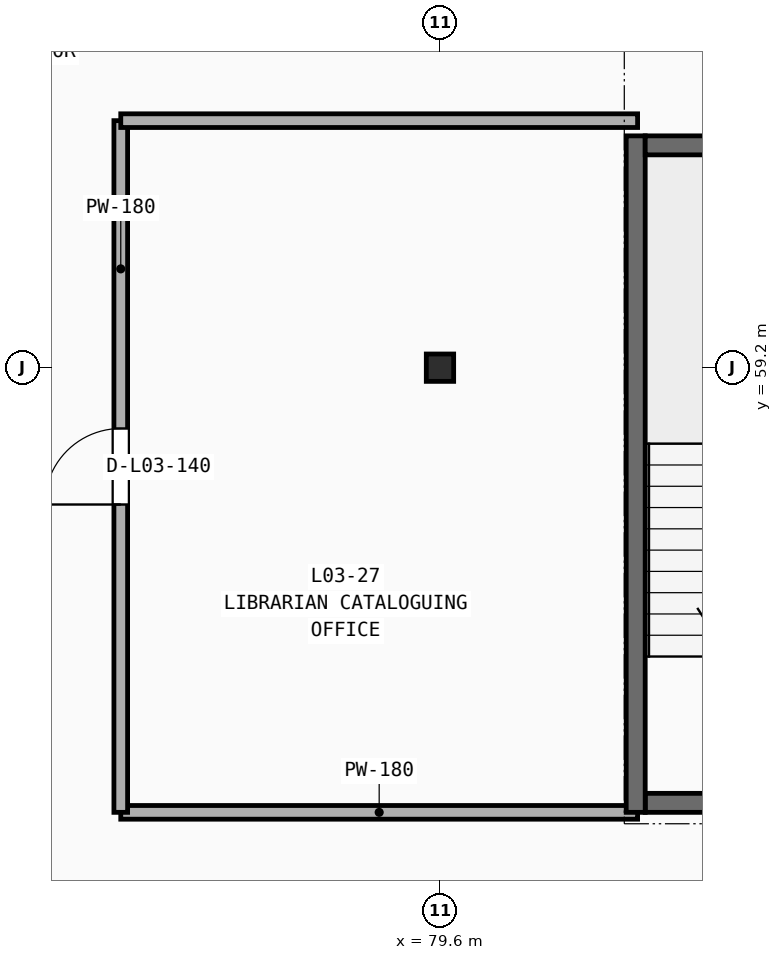
"""IFC4 building model, lengths in metres.
Left out: names, types, materials, properties, quantities, classifications, styles, units other than length and angle.
Written with IfcOpenShell. Run it as: python <this file> out.ifc"""

import sys

from ifc_helpers import new_model, si_unit, direction, frame, frame_2d, origin, origin_2d, place, context, subcontext, project, spatial, rectangle, extrude, element, fill, save


model = new_model("IFC4")
c1 = context("Model", 3, precision=1e-05, world=origin(), true_north=direction((0.0, 1.0)))
c2 = subcontext(c1, "Body", "Model", "MODEL_VIEW")
j1 = project(units=[si_unit("LENGTHUNIT", "METRE"), si_unit("PLANEANGLEUNIT", "RADIAN")], contexts=[c1])
p1 = place(None, origin())
s1 = spatial("IfcSite", under=j1, at=p1, CompositionType="ELEMENT")
p2 = place(p1, origin())
s2 = spatial("IfcBuilding", under=s1, at=p2, CompositionType="ELEMENT")
p3 = place(p2, frame((0.0, 0.0, 13.8)))
s3 = spatial("IfcBuildingStorey", under=s2, at=p3, CompositionType="ELEMENT", Elevation=13.8)
p4 = place(p3, frame((79.6, 59.2, 0.0), z_axis=(0.0, 0.0, 1.0), x_axis=(1.0, 0.0, 0.0)))
e1 = element("IfcColumn", 1, at=p4, inside=s3, PredefinedType="COLUMN", context=c2, shape_type="SweptSolid", body=[
    extrude(rectangle(XDim=0.36, YDim=0.36, at=origin_2d()), origin(), (0.0, 0.0, 1.0), 3.9),
])
p5 = place(p3, frame((75.4, 53.35, 0.0), z_axis=(0.0, 0.0, 1.0), x_axis=(1.0, 0.0, 0.0)))
e2 = element("IfcWall", 2, at=p5, inside=s3, PredefinedType="PARTITIONING", context=c2, shape_type="SweptSolid", body=[
    extrude(rectangle(XDim=6.8, YDim=0.18, at=frame_2d((3.4, 0.0))), origin(), (0.0, 0.0, 1.0), 3.17),
])
p6 = place(p3, frame((75.4, 53.35, 0.0), z_axis=(0.0, 0.0, 1.0), x_axis=(0.0, 1.0, 0.0)))
e3 = element("IfcWall", 3, at=p6, inside=s3, PredefinedType="PARTITIONING", context=c2, shape_type="SweptSolid", body=[
    extrude(rectangle(XDim=9.1, YDim=0.18, at=frame_2d((4.55, 0.0))), origin(), (0.0, 0.0, 1.0), 3.2),
])
p7 = place(p6, frame((4.05, 0.0, -0.01)))
e4 = element("IfcOpeningElement", 4, at=p7, cuts=e3, PredefinedType="OPENING", context=c2, shape_type="SweptSolid", body=[
    extrude(rectangle(XDim=1.0, YDim=2.16, at=frame_2d((0.5, 1.08))), frame((0.0, 0.1, 0.0), z_axis=(0.0, -1.0, 0.0), x_axis=(1.0, 0.0, 0.0)), (0.0, 0.0, 1.0), 0.2),
])
p8 = place(p3, frame((75.4, 62.45, 0.0), z_axis=(0.0, 0.0, 1.0), x_axis=(1.0, 0.0, 0.0)))
e5 = element("IfcWall", 5, at=p8, inside=s3, PredefinedType="PARTITIONING", context=c2, shape_type="SweptSolid", body=[
    extrude(rectangle(XDim=6.8, YDim=0.18, at=frame_2d((3.4, 0.0))), origin(), (0.0, 0.0, 1.0), 3.17),
])
p9 = place(p3, frame((82.3, 53.475, 0.0), z_axis=(0.0, 0.0, 1.0), x_axis=(1.0, 0.0, 0.0)))
e6 = element("IfcWall", 6, at=p9, inside=s3, PredefinedType="SHEAR", context=c2, shape_type="SweptSolid", body=[
    extrude(rectangle(XDim=3.5, YDim=0.25, at=frame_2d((1.75, 0.0))), origin(), (0.0, 0.0, 1.0), 3.9),
])
p10 = place(p9, frame((1.1, 0.0, -0.01)))
e7 = element("IfcOpeningElement", 7, at=p10, cuts=e6, PredefinedType="OPENING", context=c2, shape_type="SweptSolid", body=[
    extrude(rectangle(XDim=1.3, YDim=2.16, at=frame_2d((0.65, 1.08))), frame((0.0, 0.135, 0.0), z_axis=(0.0, -1.0, 0.0), x_axis=(1.0, 0.0, 0.0)), (0.0, 0.0, 1.0), 0.27),
])
p11 = place(p3, frame((82.175, 53.35, 0.0), z_axis=(0.0, 0.0, 1.0), x_axis=(0.0, 1.0, 0.0)))
e8 = element("IfcWall", 8, at=p11, inside=s3, PredefinedType="SHEAR", context=c2, shape_type="SweptSolid", body=[
    extrude(rectangle(XDim=8.9, YDim=0.25, at=frame_2d((4.45, 0.0))), origin(), (0.0, 0.0, 1.0), 3.9),
])
p12 = place(p3, frame((85.8, 62.125, 0.0), z_axis=(0.0, 0.0, 1.0), x_axis=(-1.0, 0.0, 0.0)))
e9 = element("IfcWall", 9, at=p12, inside=s3, PredefinedType="SHEAR", context=c2, shape_type="SweptSolid", body=[
    extrude(rectangle(XDim=3.5, YDim=0.25, at=frame_2d((1.75, 0.0))), origin(), (0.0, 0.0, 1.0), 3.9),
])
p13 = place(p7, frame((0.0, 0.0, 0.01)))
e10 = element("IfcDoor", 10, at=p13, inside=s3, OperationType="SINGLE_SWING_LEFT", PredefinedType="DOOR", context=c2, shape_type="SweptSolid", body=[
    extrude(rectangle(XDim=1.0, YDim=2.15, at=frame_2d((0.5, 1.075))), frame((0.0, 0.025, 0.0), z_axis=(0.0, -1.0, 0.0), x_axis=(1.0, 0.0, 0.0)), (0.0, 0.0, 1.0), 0.05),
])
fill(e4, e10)
save(model, sys.argv[1])
